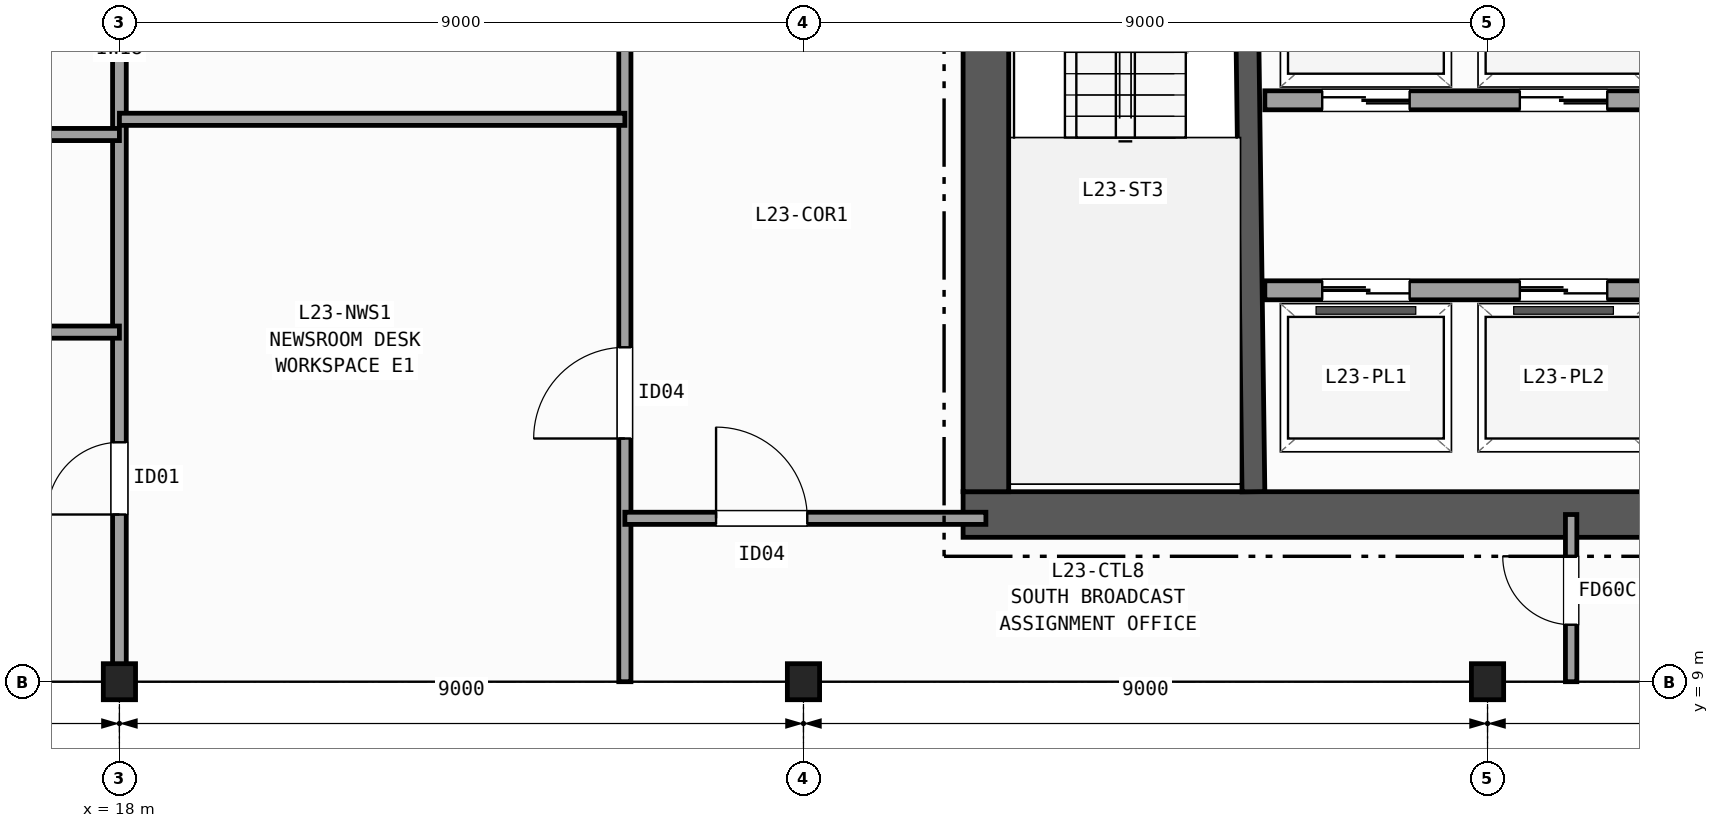
"""IFC4 building model, lengths in metres.
Left out: names, types, materials, properties, quantities, classifications, styles, units other than length and angle.
Written with IfcOpenShell. Run it as: python <this file> out.ifc"""

import sys

from ifc_helpers import new_model, si_unit, direction, frame, frame_2d, origin, origin_2d, place, context, subcontext, project, spatial, rectangle, i_section, extrude, element, fill, save


model = new_model("IFC4")
c1 = context("Model", 3, precision=1e-05, world=origin(), true_north=direction((0.0, 1.0)))
c2 = subcontext(c1, "Body", "Model", "MODEL_VIEW")
j1 = project(units=[si_unit("LENGTHUNIT", "METRE"), si_unit("PLANEANGLEUNIT", "RADIAN")], contexts=[c1])
p1 = place(None, origin())
s1 = spatial("IfcSite", under=j1, at=p1, CompositionType="ELEMENT")
p2 = place(p1, origin())
s2 = spatial("IfcBuilding", under=s1, at=p2, CompositionType="ELEMENT")
p3 = place(p2, frame((0.0, 0.0, 96.5)))
s3 = spatial("IfcBuildingStorey", under=s2, at=p3, CompositionType="ELEMENT", Elevation=96.5)
for number, where, z_axis, x_axis in (
    (1, (18.0, 9.0, 0.0), (0.0, 0.0, 1.0), (1.0, 0.0, 0.0)),
    (2, (27.0, 9.0, 0.0), (0.0, 0.0, 1.0), (1.0, 0.0, 0.0)),
    (3, (36.0, 9.0, 0.0), (0.0, 0.0, 1.0), (1.0, 0.0, 0.0)),
):
    element("IfcColumn", number, at=place(p3, frame(where, z_axis=z_axis, x_axis=x_axis)), inside=s3, PredefinedType="COLUMN", context=c2, shape_type="SweptSolid", body=[
        extrude(i_section(OverallWidth=0.424, OverallDepth=0.474, WebThickness=0.048, FlangeThickness=0.077, FilletRadius=0.015, at=origin_2d()), origin(), (0.0, 0.0, 1.0), 3.7),
    ])
p4 = place(p3, frame((29.1, 11.2, 0.0), z_axis=(0.0, 0.0, 1.0), x_axis=(1.0, 0.0, 0.0)))
e4 = element("IfcWall", 4, at=p4, inside=s3, PredefinedType="SHEAR", context=c2, shape_type="SweptSolid", body=[
    extrude(rectangle(XDim=14.0, YDim=0.6, at=frame_2d((7.0, 0.0))), origin(), (0.0, 0.0, 1.0), 3.37),
])
p5 = place(p3, frame((29.4, 24.3, 0.0), z_axis=(0.0, 0.0, 1.0), x_axis=(0.0, -1.0, 0.0)))
e5 = element("IfcWall", 5, at=p5, inside=s3, PredefinedType="SHEAR", context=c2, shape_type="SweptSolid", body=[
    extrude(rectangle(XDim=12.8, YDim=0.6, at=frame_2d((6.4, 0.0))), origin(), (0.0, 0.0, 1.0), 3.37),
])
p6 = place(p5, frame((1.4, 0.0, 0.0)))
e6 = element("IfcOpeningElement", 6, at=p6, cuts=e5, PredefinedType="OPENING", context=c2, shape_type="SweptSolid", body=[
    extrude(rectangle(XDim=1.35, YDim=2.15, at=frame_2d((0.675, 1.075))), frame((0.0, 0.31, 0.0), z_axis=(0.0, -1.0, 0.0), x_axis=(1.0, 0.0, 0.0)), (0.0, 0.0, 1.0), 0.62),
])
p7 = place(p3, frame((32.92, 11.5, 0.0), z_axis=(0.0, 0.0, 1.0), x_axis=(-0.013244407292, 0.999912288991, 0.0)))
e7 = element("IfcWall", 7, at=p7, inside=s3, PredefinedType="SHEAR", context=c2, shape_type="SweptSolid", body=[
    extrude(rectangle(XDim=9.051, YDim=0.3, at=frame_2d((4.525, 0.0))), origin(), (0.0, 0.0, 1.0), 3.37),
])
p8 = place(p3, frame((33.07, 14.15, 0.0), z_axis=(0.0, 0.0, 1.0), x_axis=(1.0, 0.0, 0.0)))
e8 = element("IfcWall", 8, at=p8, inside=s3, PredefinedType="PARTITIONING", context=c2, shape_type="SweptSolid", body=[
    extrude(rectangle(XDim=9.43, YDim=0.25, at=frame_2d((4.715, 0.0))), origin(), (0.0, 0.0, 1.0), 3.37),
])
p9 = place(p8, frame((0.755, 0.0, 0.0)))
e9 = element("IfcOpeningElement", 9, at=p9, cuts=e8, PredefinedType="OPENING", context=c2, shape_type="SweptSolid", body=[
    extrude(rectangle(XDim=1.15, YDim=2.15, at=frame_2d((0.575, 1.075))), frame((0.0, 0.135, 0.0), z_axis=(0.0, -1.0, 0.0), x_axis=(1.0, 0.0, 0.0)), (0.0, 0.0, 1.0), 0.27),
])
p10 = place(p8, frame((3.355, 0.0, 0.0)))
e10 = element("IfcOpeningElement", 10, at=p10, cuts=e8, PredefinedType="OPENING", context=c2, shape_type="SweptSolid", body=[
    extrude(rectangle(XDim=1.15, YDim=2.15, at=frame_2d((0.575, 1.075))), frame((0.0, 0.135, 0.0), z_axis=(0.0, -1.0, 0.0), x_axis=(1.0, 0.0, 0.0)), (0.0, 0.0, 1.0), 0.27),
])
p11 = place(p3, frame((40.98, 16.65, 0.0), z_axis=(0.0, 0.0, 1.0), x_axis=(-1.0, 0.0, 0.0)))
e11 = element("IfcWall", 11, at=p11, inside=s3, PredefinedType="PARTITIONING", context=c2, shape_type="SweptSolid", body=[
    extrude(rectangle(XDim=7.91, YDim=0.25, at=frame_2d((3.955, 0.0))), origin(), (0.0, 0.0, 1.0), 3.37),
])
p12 = place(p11, frame((6.005, 0.0, 0.0)))
e12 = element("IfcOpeningElement", 12, at=p12, cuts=e11, PredefinedType="OPENING", context=c2, shape_type="SweptSolid", body=[
    extrude(rectangle(XDim=1.15, YDim=2.15, at=frame_2d((0.575, 1.075))), frame((0.0, 0.135, 0.0), z_axis=(0.0, -1.0, 0.0), x_axis=(1.0, 0.0, 0.0)), (0.0, 0.0, 1.0), 0.27),
])
p13 = place(p11, frame((3.405, 0.0, 0.0)))
e13 = element("IfcOpeningElement", 13, at=p13, cuts=e11, PredefinedType="OPENING", context=c2, shape_type="SweptSolid", body=[
    extrude(rectangle(XDim=1.15, YDim=2.15, at=frame_2d((0.575, 1.075))), frame((0.0, 0.135, 0.0), z_axis=(0.0, -1.0, 0.0), x_axis=(1.0, 0.0, 0.0)), (0.0, 0.0, 1.0), 0.27),
])
p14 = place(p3, frame((24.65, 9.0, 0.0), z_axis=(0.0, 0.0, 1.0), x_axis=(0.0, 1.0, 0.0)))
e14 = element("IfcWall", 14, at=p14, inside=s3, PredefinedType="PARTITIONING", context=c2, shape_type="SweptSolid", body=[
    extrude(rectangle(XDim=19.2, YDim=0.16, at=frame_2d((9.6, 0.0))), origin(), (0.0, 0.0, 1.0), 2.577),
])
p15 = place(p14, frame((3.2, 0.0, 0.0)))
e15 = element("IfcOpeningElement", 15, at=p15, cuts=e14, PredefinedType="OPENING", context=c2, shape_type="SweptSolid", body=[
    extrude(rectangle(XDim=1.2, YDim=2.15, at=frame_2d((0.6, 1.075))), frame((0.0, 0.09, 0.0), z_axis=(0.0, -1.0, 0.0), x_axis=(1.0, 0.0, 0.0)), (0.0, 0.0, 1.0), 0.18),
])
p16 = place(p14, frame((10.99, 0.0, 0.0)))
e16 = element("IfcOpeningElement", 16, at=p16, cuts=e14, PredefinedType="OPENING", context=c2, shape_type="SweptSolid", body=[
    extrude(rectangle(XDim=0.86, YDim=2.05, at=frame_2d((0.43, 1.025))), frame((0.0, 0.09, 0.0), z_axis=(0.0, -1.0, 0.0), x_axis=(1.0, 0.0, 0.0)), (0.0, 0.0, 1.0), 0.18),
])
p17 = place(p3, frame((18.0, 9.0, 0.0), z_axis=(0.0, 0.0, 1.0), x_axis=(0.0, 1.0, 0.0)))
e17 = element("IfcWall", 17, at=p17, inside=s3, PredefinedType="PARTITIONING", context=c2, shape_type="SweptSolid", body=[
    extrude(rectangle(XDim=15.58, YDim=0.18, at=frame_2d((7.79, 0.0))), origin(), (0.0, 0.0, 1.0), 2.577),
])
p18 = place(p17, frame((2.2, 0.0, 0.0)))
e18 = element("IfcOpeningElement", 18, at=p18, cuts=e17, PredefinedType="OPENING", context=c2, shape_type="SweptSolid", body=[
    extrude(rectangle(XDim=0.95, YDim=2.1, at=frame_2d((0.475, 1.05))), frame((0.0, 0.1, 0.0), z_axis=(0.0, -1.0, 0.0), x_axis=(1.0, 0.0, 0.0)), (0.0, 0.0, 1.0), 0.2),
])
p19 = place(p17, frame((13.5, 0.0, 0.0)))
e19 = element("IfcOpeningElement", 19, at=p19, cuts=e17, PredefinedType="OPENING", context=c2, shape_type="SweptSolid", body=[
    extrude(rectangle(XDim=1.0, YDim=2.1, at=frame_2d((0.5, 1.05))), frame((0.0, 0.1, 0.0), z_axis=(0.0, -1.0, 0.0), x_axis=(1.0, 0.0, 0.0)), (0.0, 0.0, 1.0), 0.2),
])
p20 = place(p3, frame((18.0, 16.4, 0.0), z_axis=(0.0, 0.0, 1.0), x_axis=(1.0, 0.0, 0.0)))
e20 = element("IfcWall", 20, at=p20, inside=s3, PredefinedType="PARTITIONING", context=c2, shape_type="SweptSolid", body=[
    extrude(rectangle(XDim=6.65, YDim=0.16, at=frame_2d((3.325, 0.0))), origin(), (0.0, 0.0, 1.0), 2.742),
])
p21 = place(p3, frame((9.0, 13.6, 0.0), z_axis=(0.0, 0.0, 1.0), x_axis=(1.0, 0.0, 0.0)))
e21 = element("IfcWall", 21, at=p21, inside=s3, PredefinedType="PARTITIONING", context=c2, shape_type="SweptSolid", body=[
    extrude(rectangle(XDim=9.0, YDim=0.16, at=frame_2d((4.5, 0.0))), origin(), (0.0, 0.0, 1.0), 2.742),
])
p22 = place(p21, frame((3.5, 0.0, 0.0)))
e22 = element("IfcOpeningElement", 22, at=p22, cuts=e21, PredefinedType="OPENING", context=c2, shape_type="SweptSolid", body=[
    extrude(rectangle(XDim=1.05, YDim=2.15, at=frame_2d((0.525, 1.075))), frame((0.0, 0.09, 0.0), z_axis=(0.0, -1.0, 0.0), x_axis=(1.0, 0.0, 0.0)), (0.0, 0.0, 1.0), 0.18),
])
p23 = place(p3, frame((9.0, 16.2, 0.0), z_axis=(0.0, 0.0, 1.0), x_axis=(1.0, 0.0, 0.0)))
e23 = element("IfcWall", 23, at=p23, inside=s3, PredefinedType="PARTITIONING", context=c2, shape_type="SweptSolid", body=[
    extrude(rectangle(XDim=9.0, YDim=0.16, at=frame_2d((4.5, 0.0))), origin(), (0.0, 0.0, 1.0), 2.742),
])
p24 = place(p23, frame((3.5, 0.0, 0.0)))
e24 = element("IfcOpeningElement", 24, at=p24, cuts=e23, PredefinedType="OPENING", context=c2, shape_type="SweptSolid", body=[
    extrude(rectangle(XDim=1.2, YDim=2.15, at=frame_2d((0.6, 1.075))), frame((0.0, 0.09, 0.0), z_axis=(0.0, -1.0, 0.0), x_axis=(1.0, 0.0, 0.0)), (0.0, 0.0, 1.0), 0.18),
])
p25 = place(p3, frame((24.65, 11.15, 0.0), z_axis=(0.0, 0.0, 1.0), x_axis=(1.0, 0.0, 0.0)))
e25 = element("IfcWall", 25, at=p25, inside=s3, PredefinedType="PARTITIONING", context=c2, shape_type="SweptSolid", body=[
    extrude(rectangle(XDim=4.75, YDim=0.16, at=frame_2d((2.375, 0.0))), origin(), (0.0, 0.0, 1.0), 2.742),
])
p26 = place(p25, frame((1.2, 0.0, 0.0)))
e26 = element("IfcOpeningElement", 26, at=p26, cuts=e25, PredefinedType="OPENING", context=c2, shape_type="SweptSolid", body=[
    extrude(rectangle(XDim=1.2, YDim=2.15, at=frame_2d((0.6, 1.075))), frame((0.0, 0.09, 0.0), z_axis=(0.0, -1.0, 0.0), x_axis=(1.0, 0.0, 0.0)), (0.0, 0.0, 1.0), 0.18),
])
p27 = place(p3, frame((37.1, 9.0, 0.0), z_axis=(0.0, 0.0, 1.0), x_axis=(0.0, 1.0, 0.0)))
e27 = element("IfcWall", 27, at=p27, inside=s3, PredefinedType="PARTITIONING", context=c2, shape_type="SweptSolid", body=[
    extrude(rectangle(XDim=2.2, YDim=0.15, at=frame_2d((1.1, 0.0))), origin(), (0.0, 0.0, 1.0), 2.577),
])
p28 = place(p27, frame((0.75, 0.0, 0.0)))
e28 = element("IfcOpeningElement", 28, at=p28, cuts=e27, PredefinedType="OPENING", context=c2, shape_type="SweptSolid", body=[
    extrude(rectangle(XDim=0.9, YDim=2.1, at=frame_2d((0.45, 1.05))), frame((0.0, 0.085, 0.0), z_axis=(0.0, -1.0, 0.0), x_axis=(1.0, 0.0, 0.0)), (0.0, 0.0, 1.0), 0.17),
])
p29 = place(p9, origin())
e29 = element("IfcDoor", 29, at=p29, inside=s3, OperationType="DOUBLE_DOOR_SLIDING", PredefinedType="DOOR", context=c2, shape_type="SweptSolid", body=[
    extrude(rectangle(XDim=1.15, YDim=2.15, at=frame_2d((0.575, 1.075))), frame((0.0, 0.025, 0.0), z_axis=(0.0, -1.0, 0.0), x_axis=(1.0, 0.0, 0.0)), (0.0, 0.0, 1.0), 0.05),
])
fill(e9, e29)
p30 = place(p10, origin())
e30 = element("IfcDoor", 30, at=p30, inside=s3, OperationType="DOUBLE_DOOR_SLIDING", PredefinedType="DOOR", context=c2, shape_type="SweptSolid", body=[
    extrude(rectangle(XDim=1.15, YDim=2.15, at=frame_2d((0.575, 1.075))), frame((0.0, 0.025, 0.0), z_axis=(0.0, -1.0, 0.0), x_axis=(1.0, 0.0, 0.0)), (0.0, 0.0, 1.0), 0.05),
])
fill(e10, e30)
p31 = place(p12, origin())
e31 = element("IfcDoor", 31, at=p31, inside=s3, OperationType="DOUBLE_DOOR_SLIDING", PredefinedType="DOOR", context=c2, shape_type="SweptSolid", body=[
    extrude(rectangle(XDim=1.15, YDim=2.15, at=frame_2d((0.575, 1.075))), frame((0.0, 0.025, 0.0), z_axis=(0.0, -1.0, 0.0), x_axis=(1.0, 0.0, 0.0)), (0.0, 0.0, 1.0), 0.05),
])
fill(e12, e31)
p32 = place(p13, origin())
e32 = element("IfcDoor", 32, at=p32, inside=s3, OperationType="DOUBLE_DOOR_SLIDING", PredefinedType="DOOR", context=c2, shape_type="SweptSolid", body=[
    extrude(rectangle(XDim=1.15, YDim=2.15, at=frame_2d((0.575, 1.075))), frame((0.0, 0.025, 0.0), z_axis=(0.0, -1.0, 0.0), x_axis=(1.0, 0.0, 0.0)), (0.0, 0.0, 1.0), 0.05),
])
fill(e13, e32)
p33 = place(p15, origin())
e33 = element("IfcDoor", 33, at=p33, inside=s3, OperationType="SINGLE_SWING_LEFT", PredefinedType="DOOR", context=c2, shape_type="SweptSolid", body=[
    extrude(rectangle(XDim=1.2, YDim=2.15, at=frame_2d((0.6, 1.075))), frame((0.0, 0.025, 0.0), z_axis=(0.0, -1.0, 0.0), x_axis=(1.0, 0.0, 0.0)), (0.0, 0.0, 1.0), 0.05),
])
fill(e15, e33)
p34 = place(p18, origin())
e34 = element("IfcDoor", 34, at=p34, inside=s3, OperationType="SINGLE_SWING_LEFT", PredefinedType="DOOR", context=c2, shape_type="SweptSolid", body=[
    extrude(rectangle(XDim=0.95, YDim=2.1, at=frame_2d((0.475, 1.05))), frame((0.0, 0.025, 0.0), z_axis=(0.0, -1.0, 0.0), x_axis=(1.0, 0.0, 0.0)), (0.0, 0.0, 1.0), 0.05),
])
fill(e18, e34)
p35 = place(p26, origin())
e35 = element("IfcDoor", 35, at=p35, inside=s3, OperationType="SINGLE_SWING_LEFT", PredefinedType="DOOR", context=c2, shape_type="SweptSolid", body=[
    extrude(rectangle(XDim=1.2, YDim=2.15, at=frame_2d((0.6, 1.075))), frame((0.0, 0.025, 0.0), z_axis=(0.0, -1.0, 0.0), x_axis=(1.0, 0.0, 0.0)), (0.0, 0.0, 1.0), 0.05),
])
fill(e26, e35)
p36 = place(p28, origin())
e36 = element("IfcDoor", 36, at=p36, inside=s3, OperationType="SINGLE_SWING_RIGHT", PredefinedType="DOOR", context=c2, shape_type="SweptSolid", body=[
    extrude(rectangle(XDim=0.9, YDim=2.1, at=frame_2d((0.45, 1.05))), frame((0.0, 0.025, 0.0), z_axis=(0.0, -1.0, 0.0), x_axis=(1.0, 0.0, 0.0)), (0.0, 0.0, 1.0), 0.05),
])
fill(e28, e36)
save(model, sys.argv[1])
